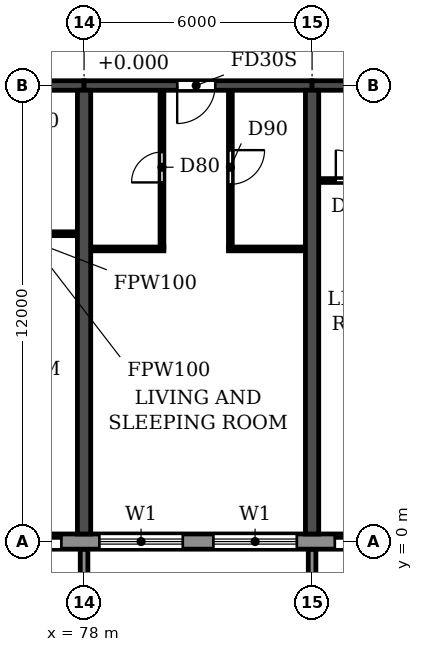
"""IFC4 building model, lengths in metres.
Left out: names, types, materials, properties, quantities, classifications, styles, units other than length and angle.
Written with IfcOpenShell. Run it as: python <this file> out.ifc"""

import sys

from ifc_helpers import new_model, si_unit, direction, frame, frame_2d, origin, place, context, subcontext, project, spatial, polyline, rectangle, outline, extrude, source, transform, mapped, element, fill, save


model = new_model("IFC4")
c1 = context("Model", 3, precision=1e-05, world=origin(), true_north=direction((0.0, 1.0)))
c2 = subcontext(c1, "Body", "Model", "MODEL_VIEW")
j1 = project(units=[si_unit("LENGTHUNIT", "METRE"), si_unit("PLANEANGLEUNIT", "RADIAN")], contexts=[c1])
p1 = place(None, origin())
s1 = spatial("IfcSite", under=j1, at=p1, CompositionType="ELEMENT")
p2 = place(p1, origin())
s2 = spatial("IfcBuilding", under=s1, at=p2, CompositionType="ELEMENT")
p3 = place(p2, frame((0.0, 0.0, 92.7)))
s3 = spatial("IfcBuildingStorey", under=s2, at=p3, CompositionType="ELEMENT", Elevation=92.7)
for number, where, z_axis, x_axis in (
    (1, (78.0, 0.2, 0.0), (0.0, 0.0, 1.0), (0.0, 1.0, 0.0)),
    (2, (84.0, 0.2, 0.0), (0.0, 0.0, 1.0), (0.0, 1.0, 0.0)),
):
    element("IfcWall", number, at=place(p3, frame(where, z_axis=z_axis, x_axis=x_axis)), inside=s3, PredefinedType="SHEAR", context=c2, shape_type="SweptSolid", body=[
        extrude(rectangle(XDim=11.675, YDim=0.35, at=frame_2d((5.837, 0.0))), origin(), (0.0, 0.0, 1.0), 3.06),
    ])
p4 = place(p3, frame((72.0, 12.0, 0.0), z_axis=(0.0, 0.0, 1.0), x_axis=(1.0, 0.0, 0.0)))
e3 = element("IfcWall", 3, at=p4, inside=s3, PredefinedType="SHEAR", context=c2, shape_type="SweptSolid", body=[
    extrude(rectangle(XDim=6.0, YDim=0.25, at=frame_2d((3.0, 0.0))), origin(), (0.0, 0.0, 1.0), 2.46),
])
p5 = place(p4, frame((2.45, 0.0, 0.0)))
e4 = element("IfcOpeningElement", 4, at=p5, cuts=e3, PredefinedType="OPENING", context=c2, shape_type="SweptSolid", body=[
    extrude(rectangle(XDim=1.0, YDim=2.1, at=frame_2d((0.5, 1.05))), frame((0.0, 0.135, 0.0), z_axis=(0.0, -1.0, 0.0), x_axis=(1.0, 0.0, 0.0)), (0.0, 0.0, 1.0), 0.27),
])
p6 = place(p3, frame((78.0, 12.0, 0.0), z_axis=(0.0, 0.0, 1.0), x_axis=(1.0, 0.0, 0.0)))
e5 = element("IfcWall", 5, at=p6, inside=s3, PredefinedType="SHEAR", context=c2, shape_type="SweptSolid", body=[
    extrude(rectangle(XDim=6.0, YDim=0.25, at=frame_2d((3.0, 0.0))), origin(), (0.0, 0.0, 1.0), 2.46),
])
p7 = place(p6, frame((2.45, 0.0, 0.0)))
e6 = element("IfcOpeningElement", 6, at=p7, cuts=e5, PredefinedType="OPENING", context=c2, shape_type="SweptSolid", body=[
    extrude(rectangle(XDim=1.0, YDim=2.1, at=frame_2d((0.5, 1.05))), frame((0.0, 0.135, 0.0), z_axis=(0.0, -1.0, 0.0), x_axis=(1.0, 0.0, 0.0)), (0.0, 0.0, 1.0), 0.27),
])
p8 = place(p3, frame((84.0, 12.0, 0.0), z_axis=(0.0, 0.0, 1.0), x_axis=(1.0, 0.0, 0.0)))
e7 = element("IfcWall", 7, at=p8, inside=s3, PredefinedType="SHEAR", context=c2, shape_type="SweptSolid", body=[
    extrude(rectangle(XDim=6.0, YDim=0.25, at=frame_2d((3.0, 0.0))), origin(), (0.0, 0.0, 1.0), 2.46),
])
p9 = place(p8, frame((2.45, 0.0, 0.0)))
e8 = element("IfcOpeningElement", 8, at=p9, cuts=e7, PredefinedType="OPENING", context=c2, shape_type="SweptSolid", body=[
    extrude(rectangle(XDim=1.0, YDim=2.1, at=frame_2d((0.5, 1.05))), frame((0.0, 0.135, 0.0), z_axis=(0.0, -1.0, 0.0), x_axis=(1.0, 0.0, 0.0)), (0.0, 0.0, 1.0), 0.27),
])
p10 = place(p3, frame((10.683, 0.0, 0.0), z_axis=(0.0, 0.0, 1.0), x_axis=(1.0, 0.0, 0.0)))
e9 = element("IfcWall", 9, at=p10, inside=s3, PredefinedType="STANDARD", context=c2, shape_type="SweptSolid", body=[
    extrude(rectangle(XDim=80.634, YDim=0.4, at=frame_2d((40.317, 0.0))), origin(), (0.0, 0.0, 1.0), 3.06),
])
p11 = place(p10, frame((1.717, 0.0, 0.9)))
e10 = element("IfcOpeningElement", 10, at=p11, cuts=e9, PredefinedType="OPENING", context=c2, shape_type="SweptSolid", body=[
    extrude(rectangle(XDim=2.2, YDim=1.5, at=frame_2d((1.1, 0.75))), frame((0.0, 0.21, 0.0), z_axis=(0.0, -1.0, 0.0), x_axis=(1.0, 0.0, 0.0)), (0.0, 0.0, 1.0), 0.42),
])
p12 = place(p10, frame((4.917, 0.0, 0.0)))
e11 = element("IfcOpeningElement", 11, at=p12, cuts=e9, PredefinedType="OPENING", context=c2, shape_type="SweptSolid", body=[
    extrude(rectangle(XDim=1.8, YDim=2.4, at=frame_2d((0.9, 1.2))), frame((0.0, 0.21, 0.0), z_axis=(0.0, -1.0, 0.0), x_axis=(1.0, 0.0, 0.0)), (0.0, 0.0, 1.0), 0.42),
])
p13 = place(p10, frame((7.717, 0.0, 0.9)))
e12 = element("IfcOpeningElement", 12, at=p13, cuts=e9, PredefinedType="OPENING", context=c2, shape_type="SweptSolid", body=[
    extrude(rectangle(XDim=2.2, YDim=1.5, at=frame_2d((1.1, 0.75))), frame((0.0, 0.21, 0.0), z_axis=(0.0, -1.0, 0.0), x_axis=(1.0, 0.0, 0.0)), (0.0, 0.0, 1.0), 0.42),
])
p14 = place(p10, frame((10.717, 0.0, 0.9)))
e13 = element("IfcOpeningElement", 13, at=p14, cuts=e9, PredefinedType="OPENING", context=c2, shape_type="SweptSolid", body=[
    extrude(rectangle(XDim=2.2, YDim=1.5, at=frame_2d((1.1, 0.75))), frame((0.0, 0.21, 0.0), z_axis=(0.0, -1.0, 0.0), x_axis=(1.0, 0.0, 0.0)), (0.0, 0.0, 1.0), 0.42),
])
p15 = place(p10, frame((13.717, 0.0, 0.9)))
e14 = element("IfcOpeningElement", 14, at=p15, cuts=e9, PredefinedType="OPENING", context=c2, shape_type="SweptSolid", body=[
    extrude(rectangle(XDim=2.2, YDim=1.5, at=frame_2d((1.1, 0.75))), frame((0.0, 0.21, 0.0), z_axis=(0.0, -1.0, 0.0), x_axis=(1.0, 0.0, 0.0)), (0.0, 0.0, 1.0), 0.42),
])
p16 = place(p10, frame((16.717, 0.0, 0.9)))
e15 = element("IfcOpeningElement", 15, at=p16, cuts=e9, PredefinedType="OPENING", context=c2, shape_type="SweptSolid", body=[
    extrude(rectangle(XDim=2.2, YDim=1.5, at=frame_2d((1.1, 0.75))), frame((0.0, 0.21, 0.0), z_axis=(0.0, -1.0, 0.0), x_axis=(1.0, 0.0, 0.0)), (0.0, 0.0, 1.0), 0.42),
])
p17 = place(p10, frame((19.717, 0.0, 0.9)))
e16 = element("IfcOpeningElement", 16, at=p17, cuts=e9, PredefinedType="OPENING", context=c2, shape_type="SweptSolid", body=[
    extrude(rectangle(XDim=2.2, YDim=1.5, at=frame_2d((1.1, 0.75))), frame((0.0, 0.21, 0.0), z_axis=(0.0, -1.0, 0.0), x_axis=(1.0, 0.0, 0.0)), (0.0, 0.0, 1.0), 0.42),
])
p18 = place(p10, frame((22.717, 0.0, 0.9)))
e17 = element("IfcOpeningElement", 17, at=p18, cuts=e9, PredefinedType="OPENING", context=c2, shape_type="SweptSolid", body=[
    extrude(rectangle(XDim=2.2, YDim=1.5, at=frame_2d((1.1, 0.75))), frame((0.0, 0.21, 0.0), z_axis=(0.0, -1.0, 0.0), x_axis=(1.0, 0.0, 0.0)), (0.0, 0.0, 1.0), 0.42),
])
p19 = place(p10, frame((25.717, 0.0, 0.9)))
e18 = element("IfcOpeningElement", 18, at=p19, cuts=e9, PredefinedType="OPENING", context=c2, shape_type="SweptSolid", body=[
    extrude(rectangle(XDim=2.2, YDim=1.5, at=frame_2d((1.1, 0.75))), frame((0.0, 0.21, 0.0), z_axis=(0.0, -1.0, 0.0), x_axis=(1.0, 0.0, 0.0)), (0.0, 0.0, 1.0), 0.42),
])
p20 = place(p10, frame((28.917, 0.0, 0.0)))
e19 = element("IfcOpeningElement", 19, at=p20, cuts=e9, PredefinedType="OPENING", context=c2, shape_type="SweptSolid", body=[
    extrude(rectangle(XDim=1.8, YDim=2.4, at=frame_2d((0.9, 1.2))), frame((0.0, 0.21, 0.0), z_axis=(0.0, -1.0, 0.0), x_axis=(1.0, 0.0, 0.0)), (0.0, 0.0, 1.0), 0.42),
])
p21 = place(p10, frame((31.717, 0.0, 0.9)))
e20 = element("IfcOpeningElement", 20, at=p21, cuts=e9, PredefinedType="OPENING", context=c2, shape_type="SweptSolid", body=[
    extrude(rectangle(XDim=2.2, YDim=1.5, at=frame_2d((1.1, 0.75))), frame((0.0, 0.21, 0.0), z_axis=(0.0, -1.0, 0.0), x_axis=(1.0, 0.0, 0.0)), (0.0, 0.0, 1.0), 0.42),
])
p22 = place(p10, frame((34.717, 0.0, 0.9)))
e21 = element("IfcOpeningElement", 21, at=p22, cuts=e9, PredefinedType="OPENING", context=c2, shape_type="SweptSolid", body=[
    extrude(rectangle(XDim=2.2, YDim=1.5, at=frame_2d((1.1, 0.75))), frame((0.0, 0.21, 0.0), z_axis=(0.0, -1.0, 0.0), x_axis=(1.0, 0.0, 0.0)), (0.0, 0.0, 1.0), 0.42),
])
p23 = place(p10, frame((37.917, 0.0, 0.0)))
e22 = element("IfcOpeningElement", 22, at=p23, cuts=e9, PredefinedType="OPENING", context=c2, shape_type="SweptSolid", body=[
    extrude(rectangle(XDim=1.8, YDim=2.4, at=frame_2d((0.9, 1.2))), frame((0.0, 0.21, 0.0), z_axis=(0.0, -1.0, 0.0), x_axis=(1.0, 0.0, 0.0)), (0.0, 0.0, 1.0), 0.42),
])
p24 = place(p10, frame((40.717, 0.0, 0.9)))
e23 = element("IfcOpeningElement", 23, at=p24, cuts=e9, PredefinedType="OPENING", context=c2, shape_type="SweptSolid", body=[
    extrude(rectangle(XDim=2.2, YDim=1.5, at=frame_2d((1.1, 0.75))), frame((0.0, 0.21, 0.0), z_axis=(0.0, -1.0, 0.0), x_axis=(1.0, 0.0, 0.0)), (0.0, 0.0, 1.0), 0.42),
])
p25 = place(p10, frame((43.717, 0.0, 0.9)))
e24 = element("IfcOpeningElement", 24, at=p25, cuts=e9, PredefinedType="OPENING", context=c2, shape_type="SweptSolid", body=[
    extrude(rectangle(XDim=2.2, YDim=1.5, at=frame_2d((1.1, 0.75))), frame((0.0, 0.21, 0.0), z_axis=(0.0, -1.0, 0.0), x_axis=(1.0, 0.0, 0.0)), (0.0, 0.0, 1.0), 0.42),
])
p26 = place(p10, frame((46.717, 0.0, 0.9)))
e25 = element("IfcOpeningElement", 25, at=p26, cuts=e9, PredefinedType="OPENING", context=c2, shape_type="SweptSolid", body=[
    extrude(rectangle(XDim=2.2, YDim=1.5, at=frame_2d((1.1, 0.75))), frame((0.0, 0.21, 0.0), z_axis=(0.0, -1.0, 0.0), x_axis=(1.0, 0.0, 0.0)), (0.0, 0.0, 1.0), 0.42),
])
p27 = place(p10, frame((49.717, 0.0, 0.9)))
e26 = element("IfcOpeningElement", 26, at=p27, cuts=e9, PredefinedType="OPENING", context=c2, shape_type="SweptSolid", body=[
    extrude(rectangle(XDim=2.2, YDim=1.5, at=frame_2d((1.1, 0.75))), frame((0.0, 0.21, 0.0), z_axis=(0.0, -1.0, 0.0), x_axis=(1.0, 0.0, 0.0)), (0.0, 0.0, 1.0), 0.42),
])
p28 = place(p10, frame((52.917, 0.0, 0.0)))
e27 = element("IfcOpeningElement", 27, at=p28, cuts=e9, PredefinedType="OPENING", context=c2, shape_type="SweptSolid", body=[
    extrude(rectangle(XDim=1.8, YDim=2.4, at=frame_2d((0.9, 1.2))), frame((0.0, 0.21, 0.0), z_axis=(0.0, -1.0, 0.0), x_axis=(1.0, 0.0, 0.0)), (0.0, 0.0, 1.0), 0.42),
])
p29 = place(p10, frame((55.717, 0.0, 0.9)))
e28 = element("IfcOpeningElement", 28, at=p29, cuts=e9, PredefinedType="OPENING", context=c2, shape_type="SweptSolid", body=[
    extrude(rectangle(XDim=2.2, YDim=1.5, at=frame_2d((1.1, 0.75))), frame((0.0, 0.21, 0.0), z_axis=(0.0, -1.0, 0.0), x_axis=(1.0, 0.0, 0.0)), (0.0, 0.0, 1.0), 0.42),
])
p30 = place(p10, frame((58.717, 0.0, 0.9)))
e29 = element("IfcOpeningElement", 29, at=p30, cuts=e9, PredefinedType="OPENING", context=c2, shape_type="SweptSolid", body=[
    extrude(rectangle(XDim=2.2, YDim=1.5, at=frame_2d((1.1, 0.75))), frame((0.0, 0.21, 0.0), z_axis=(0.0, -1.0, 0.0), x_axis=(1.0, 0.0, 0.0)), (0.0, 0.0, 1.0), 0.42),
])
p31 = place(p10, frame((61.717, 0.0, 0.9)))
e30 = element("IfcOpeningElement", 30, at=p31, cuts=e9, PredefinedType="OPENING", context=c2, shape_type="SweptSolid", body=[
    extrude(rectangle(XDim=2.2, YDim=1.5, at=frame_2d((1.1, 0.75))), frame((0.0, 0.21, 0.0), z_axis=(0.0, -1.0, 0.0), x_axis=(1.0, 0.0, 0.0)), (0.0, 0.0, 1.0), 0.42),
])
p32 = place(p10, frame((64.917, 0.0, 0.0)))
e31 = element("IfcOpeningElement", 31, at=p32, cuts=e9, PredefinedType="OPENING", context=c2, shape_type="SweptSolid", body=[
    extrude(rectangle(XDim=1.8, YDim=2.4, at=frame_2d((0.9, 1.2))), frame((0.0, 0.21, 0.0), z_axis=(0.0, -1.0, 0.0), x_axis=(1.0, 0.0, 0.0)), (0.0, 0.0, 1.0), 0.42),
])
p33 = place(p10, frame((67.717, 0.0, 0.9)))
e32 = element("IfcOpeningElement", 32, at=p33, cuts=e9, PredefinedType="OPENING", context=c2, shape_type="SweptSolid", body=[
    extrude(rectangle(XDim=2.2, YDim=1.5, at=frame_2d((1.1, 0.75))), frame((0.0, 0.21, 0.0), z_axis=(0.0, -1.0, 0.0), x_axis=(1.0, 0.0, 0.0)), (0.0, 0.0, 1.0), 0.42),
])
p34 = place(p10, frame((70.717, 0.0, 0.9)))
e33 = element("IfcOpeningElement", 33, at=p34, cuts=e9, PredefinedType="OPENING", context=c2, shape_type="SweptSolid", body=[
    extrude(rectangle(XDim=2.2, YDim=1.5, at=frame_2d((1.1, 0.75))), frame((0.0, 0.21, 0.0), z_axis=(0.0, -1.0, 0.0), x_axis=(1.0, 0.0, 0.0)), (0.0, 0.0, 1.0), 0.42),
])
p35 = place(p10, frame((73.917, 0.0, 0.0)))
e34 = element("IfcOpeningElement", 34, at=p35, cuts=e9, PredefinedType="OPENING", context=c2, shape_type="SweptSolid", body=[
    extrude(rectangle(XDim=1.8, YDim=2.4, at=frame_2d((0.9, 1.2))), frame((0.0, 0.21, 0.0), z_axis=(0.0, -1.0, 0.0), x_axis=(1.0, 0.0, 0.0)), (0.0, 0.0, 1.0), 0.42),
])
p36 = place(p10, frame((76.717, 0.0, 0.9)))
e35 = element("IfcOpeningElement", 35, at=p36, cuts=e9, PredefinedType="OPENING", context=c2, shape_type="SweptSolid", body=[
    extrude(rectangle(XDim=2.2, YDim=1.5, at=frame_2d((1.1, 0.75))), frame((0.0, 0.21, 0.0), z_axis=(0.0, -1.0, 0.0), x_axis=(1.0, 0.0, 0.0)), (0.0, 0.0, 1.0), 0.42),
])
m1 = source(origin(), c2, "Body", "SweptSolid", [
    extrude(outline(polyline([(0.0, 0.0), (0.2, 0.0), (0.2, 1.65), (0.0, 1.65), (0.0, 0.0)])), origin(), (0.0, 0.0, 1.0), 3.1),
])
for number, where in (
    (36, (77.9, -1.85, 0.0)),
    (37, (83.9, -1.85, 0.0)),
):
    element("IfcWall", number, at=place(p3, frame(where)), inside=s3, PredefinedType="STANDARD", context=c2, shape_type="MappedRepresentation", body=[
        mapped(m1, transform((0.0, 0.0, 0.0))),
    ])
p37 = place(p3, frame((78.185, 7.7, 0.0), z_axis=(0.0, 0.0, 1.0), x_axis=(1.0, 0.0, 0.0)))
e38 = element("IfcWall", 38, at=p37, inside=s3, PredefinedType="PARTITIONING", context=c2, shape_type="SweptSolid", body=[
    extrude(rectangle(XDim=1.915, YDim=0.1, at=frame_2d((0.958, 0.0))), origin(), (0.0, 0.0, 1.0), 3.06),
])
for number, where, z_axis, x_axis in (
    (39, (81.8, 7.7, 0.0), (0.0, 0.0, 1.0), (1.0, 0.0, 0.0)),
    (40, (75.8, 8.1, 0.0), (0.0, 0.0, 1.0), (1.0, 0.0, 0.0)),
):
    element("IfcWall", number, at=place(p3, frame(where, z_axis=z_axis, x_axis=x_axis)), inside=s3, PredefinedType="PARTITIONING", context=c2, shape_type="SweptSolid", body=[
        extrude(rectangle(XDim=2.015, YDim=0.1, at=frame_2d((1.007, 0.0))), origin(), (0.0, 0.0, 1.0), 3.06),
    ])
p38 = place(p3, frame((84.185, 9.5, 0.0), z_axis=(0.0, 0.0, 1.0), x_axis=(1.0, 0.0, 0.0)))
e41 = element("IfcWall", 41, at=p38, inside=s3, PredefinedType="PARTITIONING", context=c2, shape_type="SweptSolid", body=[
    extrude(rectangle(XDim=1.915, YDim=0.1, at=frame_2d((0.958, 0.0))), origin(), (0.0, 0.0, 1.0), 3.06),
])
p39 = place(p38, frame((0.44, 0.0, 0.0)))
e42 = element("IfcOpeningElement", 42, at=p39, cuts=e41, PredefinedType="OPENING", context=c2, shape_type="SweptSolid", body=[
    extrude(rectangle(XDim=0.8, YDim=2.1, at=frame_2d((0.4, 1.05))), frame((0.0, 0.06, 0.0), z_axis=(0.0, -1.0, 0.0), x_axis=(1.0, 0.0, 0.0)), (0.0, 0.0, 1.0), 0.12),
])
p40 = place(p3, frame((80.05, 7.75, 0.0), z_axis=(0.0, 0.0, 1.0), x_axis=(0.0, 1.0, 0.0)))
e43 = element("IfcWall", 43, at=p40, inside=s3, PredefinedType="PARTITIONING", context=c2, shape_type="SweptSolid", body=[
    extrude(rectangle(XDim=4.115, YDim=0.1, at=frame_2d((2.058, 0.0))), origin(), (0.0, 0.0, 1.0), 3.06),
])
p41 = place(p40, frame((1.7, 0.0, 0.0)))
e44 = element("IfcOpeningElement", 44, at=p41, cuts=e43, PredefinedType="OPENING", context=c2, shape_type="SweptSolid", body=[
    extrude(rectangle(XDim=0.8, YDim=2.1, at=frame_2d((0.4, 1.05))), frame((0.0, 0.06, 0.0), z_axis=(0.0, -1.0, 0.0), x_axis=(1.0, 0.0, 0.0)), (0.0, 0.0, 1.0), 0.12),
])
p42 = place(p3, frame((81.85, 7.75, 0.0), z_axis=(0.0, 0.0, 1.0), x_axis=(0.0, 1.0, 0.0)))
e45 = element("IfcWall", 45, at=p42, inside=s3, PredefinedType="PARTITIONING", context=c2, shape_type="SweptSolid", body=[
    extrude(rectangle(XDim=4.115, YDim=0.1, at=frame_2d((2.058, 0.0))), origin(), (0.0, 0.0, 1.0), 3.06),
])
p43 = place(p42, frame((1.65, 0.0, 0.0)))
e46 = element("IfcOpeningElement", 46, at=p43, cuts=e45, PredefinedType="OPENING", context=c2, shape_type="SweptSolid", body=[
    extrude(rectangle(XDim=0.9, YDim=2.1, at=frame_2d((0.45, 1.05))), frame((0.0, 0.06, 0.0), z_axis=(0.0, -1.0, 0.0), x_axis=(1.0, 0.0, 0.0)), (0.0, 0.0, 1.0), 0.12),
])
p44 = place(p32, origin())
e47 = element("IfcDoor", 47, at=p44, inside=s3, OperationType="DOUBLE_DOOR_SLIDING", PredefinedType="DOOR", context=c2, shape_type="SweptSolid", body=[
    extrude(rectangle(XDim=1.8, YDim=2.4, at=frame_2d((0.9, 1.2))), frame((0.0, 0.025, 0.0), z_axis=(0.0, -1.0, 0.0), x_axis=(1.0, 0.0, 0.0)), (0.0, 0.0, 1.0), 0.05),
])
fill(e31, e47)
p45 = place(p33, origin())
e48 = element("IfcWindow", 48, at=p45, inside=s3, PartitioningType="DOUBLE_PANEL_HORIZONTAL", PredefinedType="WINDOW", context=c2, shape_type="SweptSolid", body=[
    extrude(rectangle(XDim=2.2, YDim=1.5, at=frame_2d((1.1, 0.75))), frame((0.0, 0.03, 0.0), z_axis=(0.0, -1.0, 0.0), x_axis=(1.0, 0.0, 0.0)), (0.0, 0.0, 1.0), 0.06),
])
fill(e32, e48)
p46 = place(p34, origin())
e49 = element("IfcWindow", 49, at=p46, inside=s3, PartitioningType="DOUBLE_PANEL_HORIZONTAL", PredefinedType="WINDOW", context=c2, shape_type="SweptSolid", body=[
    extrude(rectangle(XDim=2.2, YDim=1.5, at=frame_2d((1.1, 0.75))), frame((0.0, 0.03, 0.0), z_axis=(0.0, -1.0, 0.0), x_axis=(1.0, 0.0, 0.0)), (0.0, 0.0, 1.0), 0.06),
])
fill(e33, e49)
p47 = place(p35, origin())
e50 = element("IfcDoor", 50, at=p47, inside=s3, OperationType="DOUBLE_DOOR_SLIDING", PredefinedType="DOOR", context=c2, shape_type="SweptSolid", body=[
    extrude(rectangle(XDim=1.8, YDim=2.4, at=frame_2d((0.9, 1.2))), frame((0.0, 0.025, 0.0), z_axis=(0.0, -1.0, 0.0), x_axis=(1.0, 0.0, 0.0)), (0.0, 0.0, 1.0), 0.05),
])
fill(e34, e50)
p48 = place(p41, origin())
e51 = element("IfcDoor", 51, at=p48, inside=s3, OperationType="SINGLE_SWING_LEFT", PredefinedType="DOOR", context=c2, shape_type="SweptSolid", body=[
    extrude(rectangle(XDim=0.8, YDim=2.1, at=frame_2d((0.4, 1.05))), frame((0.0, 0.025, 0.0), z_axis=(0.0, -1.0, 0.0), x_axis=(1.0, 0.0, 0.0)), (0.0, 0.0, 1.0), 0.05),
])
fill(e44, e51)
p49 = place(p7, frame((1.0, 0.0, 0.0), z_axis=(0.0, 0.0, 1.0), x_axis=(-1.0, 0.0, 0.0)))
e52 = element("IfcDoor", 52, at=p49, inside=s3, OperationType="SINGLE_SWING_RIGHT", PredefinedType="DOOR", context=c2, shape_type="SweptSolid", body=[
    extrude(rectangle(XDim=1.0, YDim=2.1, at=frame_2d((0.5, 1.05))), frame((0.0, 0.025, 0.0), z_axis=(0.0, -1.0, 0.0), x_axis=(1.0, 0.0, 0.0)), (0.0, 0.0, 1.0), 0.05),
])
fill(e6, e52)
p50 = place(p43, frame((0.9, 0.0, 0.0), z_axis=(0.0, 0.0, 1.0), x_axis=(-1.0, 0.0, 0.0)))
e53 = element("IfcDoor", 53, at=p50, inside=s3, OperationType="SINGLE_SWING_LEFT", PredefinedType="DOOR", context=c2, shape_type="SweptSolid", body=[
    extrude(rectangle(XDim=0.9, YDim=2.1, at=frame_2d((0.45, 1.05))), frame((0.0, 0.025, 0.0), z_axis=(0.0, -1.0, 0.0), x_axis=(1.0, 0.0, 0.0)), (0.0, 0.0, 1.0), 0.05),
])
fill(e46, e53)
p51 = place(p39, origin())
e54 = element("IfcDoor", 54, at=p51, inside=s3, OperationType="SINGLE_SWING_LEFT", PredefinedType="DOOR", context=c2, shape_type="SweptSolid", body=[
    extrude(rectangle(XDim=0.8, YDim=2.1, at=frame_2d((0.4, 1.05))), frame((0.0, 0.025, 0.0), z_axis=(0.0, -1.0, 0.0), x_axis=(1.0, 0.0, 0.0)), (0.0, 0.0, 1.0), 0.05),
])
fill(e42, e54)
save(model, sys.argv[1])
